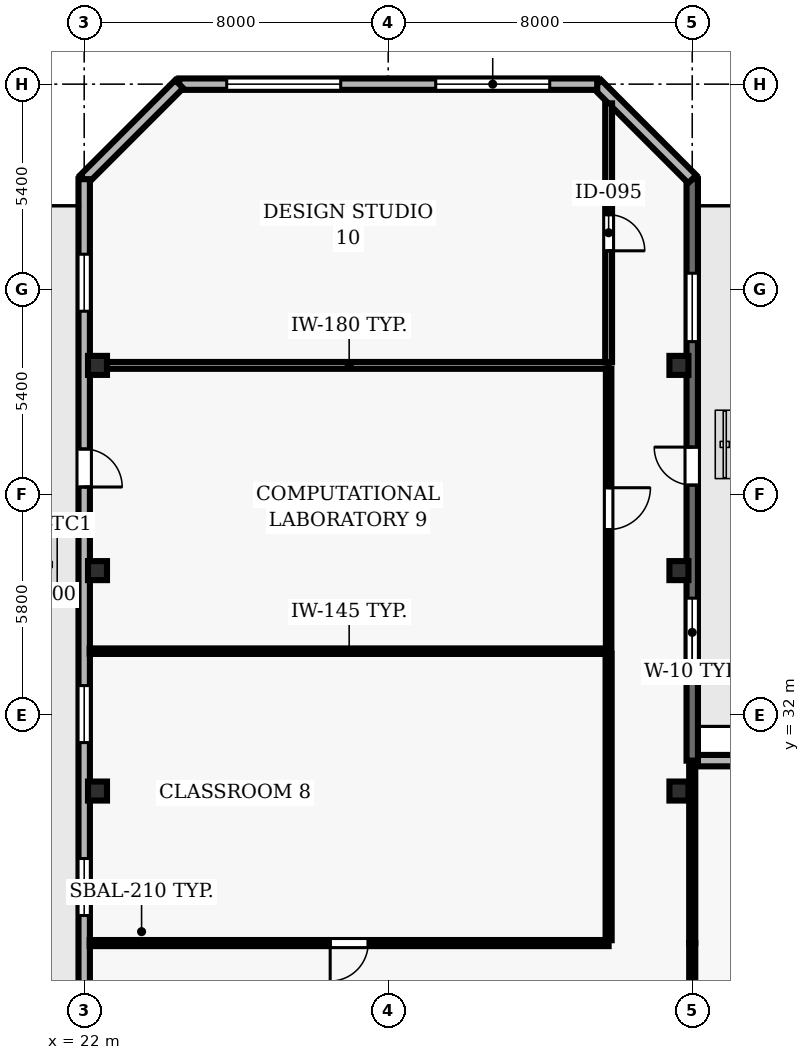
"""IFC4 building model, lengths in metres.
Left out: names, types, materials, properties, quantities, classifications, styles, units other than length and angle.
Written with IfcOpenShell. Run it as: python <this file> out.ifc"""

import sys

from ifc_helpers import new_model, si_unit, direction, frame, frame_2d, origin, origin_2d, place, context, subcontext, project, spatial, rectangle, hollow_rectangle, extrude, element, fill, save


model = new_model("IFC4")
c1 = context("Model", 3, precision=1e-05, world=origin(), true_north=direction((0.0, 1.0)))
c2 = subcontext(c1, "Body", "Model", "MODEL_VIEW")
j1 = project(units=[si_unit("LENGTHUNIT", "METRE"), si_unit("PLANEANGLEUNIT", "RADIAN")], contexts=[c1])
p1 = place(None, origin())
s1 = spatial("IfcSite", under=j1, at=p1, CompositionType="ELEMENT")
p2 = place(p1, origin())
s2 = spatial("IfcBuilding", under=s1, at=p2, CompositionType="ELEMENT")
p3 = place(p2, frame((0.0, 0.0, 107.3)))
s3 = spatial("IfcBuildingStorey", under=s2, at=p3, CompositionType="ELEMENT", Elevation=107.3)
for number, where, z_axis, x_axis in (
    (1, (22.35, 30.0, 0.0), (0.0, 0.0, 1.0), (1.0, 0.0, 0.0)),
    (2, (37.65, 30.0, 0.0), (0.0, 0.0, 1.0), (1.0, 0.0, 0.0)),
    (3, (22.35, 35.8, 0.0), (0.0, 0.0, 1.0), (1.0, 0.0, 0.0)),
    (4, (37.65, 35.8, 0.0), (0.0, 0.0, 1.0), (1.0, 0.0, 0.0)),
    (5, (22.35, 41.2, 0.0), (0.0, 0.0, 1.0), (1.0, 0.0, 0.0)),
    (6, (37.65, 41.2, 0.0), (0.0, 0.0, 1.0), (1.0, 0.0, 0.0)),
):
    element("IfcColumn", number, at=place(p3, frame(where, z_axis=z_axis, x_axis=x_axis)), inside=s3, PredefinedType="COLUMN", context=c2, shape_type="SweptSolid", body=[
        extrude(hollow_rectangle(XDim=0.5, YDim=0.5, WallThickness=0.025, at=origin_2d()), origin(), (0.0, 0.0, 1.0), 3.9),
    ])
p4 = place(p3, frame((47.456, 30.8, 0.0), z_axis=(0.0, 0.0, 1.0), x_axis=(-1.0, 0.0, 0.0)))
e7 = element("IfcWall", 7, at=p4, inside=s3, PredefinedType="SOLIDWALL", context=c2, shape_type="SweptSolid", body=[
    extrude(rectangle(XDim=9.456, YDim=0.3, at=frame_2d((4.728, 0.0))), origin(), (0.0, 0.0, 1.0), 3.69),
])
p5 = place(p4, frame((3.328, 0.0, 0.9)))
e8 = element("IfcOpeningElement", 8, at=p5, cuts=e7, PredefinedType="OPENING", context=c2, shape_type="SweptSolid", body=[
    extrude(rectangle(XDim=2.8, YDim=1.8, at=frame_2d((1.4, 0.9))), frame((0.0, 0.16, 0.0), z_axis=(0.0, -1.0, 0.0), x_axis=(1.0, 0.0, 0.0)), (0.0, 0.0, 1.0), 0.32),
])
p6 = place(p3, frame((38.0, 30.8, 0.0), z_axis=(0.0, 0.0, 1.0), x_axis=(0.0, 1.0, 0.0)))
e9 = element("IfcWall", 9, at=p6, inside=s3, PredefinedType="SOLIDWALL", context=c2, shape_type="SweptSolid", body=[
    extrude(rectangle(XDim=15.3, YDim=0.3, at=frame_2d((7.65, 0.0))), origin(), (0.0, 0.0, 1.0), 3.69),
])
p7 = place(p6, frame((7.25, 0.0, 0.0)))
e10 = element("IfcOpeningElement", 10, at=p7, cuts=e9, PredefinedType="OPENING", context=c2, shape_type="SweptSolid", body=[
    extrude(rectangle(XDim=1.0, YDim=2.2, at=frame_2d((0.5, 1.1))), frame((0.0, 0.16, 0.0), z_axis=(0.0, -1.0, 0.0), x_axis=(1.0, 0.0, 0.0)), (0.0, 0.0, 1.0), 0.32),
])
p8 = place(p6, frame((2.475, 0.0, 0.9)))
e11 = element("IfcOpeningElement", 11, at=p8, cuts=e9, PredefinedType="OPENING", context=c2, shape_type="SweptSolid", body=[
    extrude(rectangle(XDim=1.8, YDim=2.2, at=frame_2d((0.9, 1.1))), frame((0.0, 0.16, 0.0), z_axis=(0.0, -1.0, 0.0), x_axis=(1.0, 0.0, 0.0)), (0.0, 0.0, 1.0), 0.32),
])
p9 = place(p6, frame((11.025, 0.0, 0.9)))
e12 = element("IfcOpeningElement", 12, at=p9, cuts=e9, PredefinedType="OPENING", context=c2, shape_type="SweptSolid", body=[
    extrude(rectangle(XDim=1.8, YDim=2.2, at=frame_2d((0.9, 1.1))), frame((0.0, 0.16, 0.0), z_axis=(0.0, -1.0, 0.0), x_axis=(1.0, 0.0, 0.0)), (0.0, 0.0, 1.0), 0.32),
])
p10 = place(p3, frame((38.0, 46.1, 0.0), z_axis=(0.0, 0.0, 1.0), x_axis=(-0.707106781187, 0.707106781187, 0.0)))
e13 = element("IfcWall", 13, at=p10, inside=s3, PredefinedType="SOLIDWALL", context=c2, shape_type="SweptSolid", body=[
    extrude(rectangle(XDim=3.536, YDim=0.3, at=frame_2d((1.768, 0.0))), origin(), (0.0, 0.0, 1.0), 3.69),
])
p11 = place(p3, frame((35.5, 48.6, 0.0), z_axis=(0.0, 0.0, 1.0), x_axis=(-1.0, 0.0, 0.0)))
e14 = element("IfcWall", 14, at=p11, inside=s3, PredefinedType="SOLIDWALL", context=c2, shape_type="SweptSolid", body=[
    extrude(rectangle(XDim=11.0, YDim=0.3, at=frame_2d((5.5, 0.0))), origin(), (0.0, 0.0, 1.0), 3.69),
])
p12 = place(p11, frame((1.25, 0.0, 0.9)))
e15 = element("IfcOpeningElement", 15, at=p12, cuts=e14, PredefinedType="OPENING", context=c2, shape_type="SweptSolid", body=[
    extrude(rectangle(XDim=3.0, YDim=2.2, at=frame_2d((1.5, 1.1))), frame((0.0, 0.16, 0.0), z_axis=(0.0, -1.0, 0.0), x_axis=(1.0, 0.0, 0.0)), (0.0, 0.0, 1.0), 0.32),
])
p13 = place(p11, frame((6.75, 0.0, 0.9)))
e16 = element("IfcOpeningElement", 16, at=p13, cuts=e14, PredefinedType="OPENING", context=c2, shape_type="SweptSolid", body=[
    extrude(rectangle(XDim=3.0, YDim=2.2, at=frame_2d((1.5, 1.1))), frame((0.0, 0.16, 0.0), z_axis=(0.0, -1.0, 0.0), x_axis=(1.0, 0.0, 0.0)), (0.0, 0.0, 1.0), 0.32),
])
p14 = place(p3, frame((24.5, 48.6, 0.0), z_axis=(0.0, 0.0, 1.0), x_axis=(-0.707106781187, -0.707106781187, 0.0)))
e17 = element("IfcWall", 17, at=p14, inside=s3, PredefinedType="SOLIDWALL", context=c2, shape_type="SweptSolid", body=[
    extrude(rectangle(XDim=3.536, YDim=0.3, at=frame_2d((1.768, 0.0))), origin(), (0.0, 0.0, 1.0), 3.69),
])
p15 = place(p3, frame((22.0, 46.1, 0.0), z_axis=(0.0, 0.0, 1.0), x_axis=(0.0, -1.0, 0.0)))
e18 = element("IfcWall", 18, at=p15, inside=s3, PredefinedType="SOLIDWALL", context=c2, shape_type="SweptSolid", body=[
    extrude(rectangle(XDim=43.6, YDim=0.3, at=frame_2d((21.8, 0.0))), origin(), (0.0, 0.0, 1.0), 3.69),
])
p16 = place(p15, frame((7.1, 0.0, 0.0)))
e19 = element("IfcOpeningElement", 19, at=p16, cuts=e18, PredefinedType="OPENING", context=c2, shape_type="SweptSolid", body=[
    extrude(rectangle(XDim=1.0, YDim=2.2, at=frame_2d((0.5, 1.1))), frame((0.0, 0.16, 0.0), z_axis=(0.0, -1.0, 0.0), x_axis=(1.0, 0.0, 0.0)), (0.0, 0.0, 1.0), 0.32),
])
p17 = place(p15, frame((1.975, 0.0, 0.9)))
e20 = element("IfcOpeningElement", 20, at=p17, cuts=e18, PredefinedType="OPENING", context=c2, shape_type="SweptSolid", body=[
    extrude(rectangle(XDim=1.5, YDim=1.6, at=frame_2d((0.75, 0.8))), frame((0.0, 0.16, 0.0), z_axis=(0.0, -1.0, 0.0), x_axis=(1.0, 0.0, 0.0)), (0.0, 0.0, 1.0), 0.32),
])
p18 = place(p15, frame((13.325, 0.0, 0.9)))
e21 = element("IfcOpeningElement", 21, at=p18, cuts=e18, PredefinedType="OPENING", context=c2, shape_type="SweptSolid", body=[
    extrude(rectangle(XDim=1.5, YDim=1.6, at=frame_2d((0.75, 0.8))), frame((0.0, 0.16, 0.0), z_axis=(0.0, -1.0, 0.0), x_axis=(1.0, 0.0, 0.0)), (0.0, 0.0, 1.0), 0.32),
])
p19 = place(p15, frame((17.875, 0.0, 0.9)))
e22 = element("IfcOpeningElement", 22, at=p19, cuts=e18, PredefinedType="OPENING", context=c2, shape_type="SweptSolid", body=[
    extrude(rectangle(XDim=1.5, YDim=1.6, at=frame_2d((0.75, 0.8))), frame((0.0, 0.16, 0.0), z_axis=(0.0, -1.0, 0.0), x_axis=(1.0, 0.0, 0.0)), (0.0, 0.0, 1.0), 0.32),
])
p20 = place(p15, frame((23.775, 0.0, 0.9)))
e23 = element("IfcOpeningElement", 23, at=p20, cuts=e18, PredefinedType="OPENING", context=c2, shape_type="SweptSolid", body=[
    extrude(rectangle(XDim=1.5, YDim=1.6, at=frame_2d((0.75, 0.8))), frame((0.0, 0.16, 0.0), z_axis=(0.0, -1.0, 0.0), x_axis=(1.0, 0.0, 0.0)), (0.0, 0.0, 1.0), 0.32),
])
p21 = place(p15, frame((28.775, 0.0, 0.9)))
e24 = element("IfcOpeningElement", 24, at=p21, cuts=e18, PredefinedType="OPENING", context=c2, shape_type="SweptSolid", body=[
    extrude(rectangle(XDim=1.5, YDim=1.6, at=frame_2d((0.75, 0.8))), frame((0.0, 0.16, 0.0), z_axis=(0.0, -1.0, 0.0), x_axis=(1.0, 0.0, 0.0)), (0.0, 0.0, 1.0), 0.32),
])
p22 = place(p15, frame((34.675, 0.0, 0.9)))
e25 = element("IfcOpeningElement", 25, at=p22, cuts=e18, PredefinedType="OPENING", context=c2, shape_type="SweptSolid", body=[
    extrude(rectangle(XDim=1.5, YDim=1.6, at=frame_2d((0.75, 0.8))), frame((0.0, 0.16, 0.0), z_axis=(0.0, -1.0, 0.0), x_axis=(1.0, 0.0, 0.0)), (0.0, 0.0, 1.0), 0.32),
])
p23 = place(p3, frame((35.8, 26.0, 0.0), z_axis=(0.0, 0.0, 1.0), x_axis=(-1.0, 0.0, 0.0)))
e26 = element("IfcWall", 26, at=p23, inside=s3, PredefinedType="PARTITIONING", context=c2, shape_type="SweptSolid", body=[
    extrude(rectangle(XDim=13.655, YDim=0.16, at=frame_2d((6.828, 0.0))), origin(), (0.0, 0.0, 1.0), 3.69),
])
p24 = place(p23, frame((6.327, 0.0, 0.0)))
e27 = element("IfcOpeningElement", 27, at=p24, cuts=e26, PredefinedType="OPENING", context=c2, shape_type="SweptSolid", body=[
    extrude(rectangle(XDim=1.0, YDim=2.1, at=frame_2d((0.5, 1.05))), frame((0.0, 0.09, 0.0), z_axis=(0.0, -1.0, 0.0), x_axis=(1.0, 0.0, 0.0)), (0.0, 0.0, 1.0), 0.18),
])
p25 = place(p3, frame((35.8, 33.68, 0.0), z_axis=(0.0, 0.0, 1.0), x_axis=(-1.0, 0.0, 0.0)))
e28 = element("IfcWall", 28, at=p25, inside=s3, PredefinedType="PARTITIONING", context=c2, shape_type="SweptSolid", body=[
    extrude(rectangle(XDim=13.655, YDim=0.145, at=frame_2d((6.828, 0.0))), origin(), (0.0, 0.0, 1.0), 3.69),
])
p26 = place(p3, frame((35.8, 41.2, 0.0), z_axis=(0.0, 0.0, 1.0), x_axis=(-1.0, 0.0, 0.0)))
e29 = element("IfcWall", 29, at=p26, inside=s3, PredefinedType="PARTITIONING", context=c2, shape_type="SweptSolid", body=[
    extrude(rectangle(XDim=13.655, YDim=0.18, at=frame_2d((6.828, 0.0))), origin(), (0.0, 0.0, 1.0), 3.073),
])
p27 = place(p3, frame((35.8, 33.612, 0.0), z_axis=(0.0, 0.0, 1.0), x_axis=(0.0, -1.0, 0.0)))
e30 = element("IfcWall", 30, at=p27, inside=s3, PredefinedType="PARTITIONING", context=c2, shape_type="SweptSolid", body=[
    extrude(rectangle(XDim=7.537, YDim=0.16, at=frame_2d((3.769, 0.0))), origin(), (0.0, 0.0, 1.0), 3.69),
])
p28 = place(p3, frame((35.8, 41.115, 0.0), z_axis=(0.0, 0.0, 1.0), x_axis=(0.0, -1.0, 0.0)))
e31 = element("IfcWall", 31, at=p28, inside=s3, PredefinedType="PARTITIONING", context=c2, shape_type="SweptSolid", body=[
    extrude(rectangle(XDim=7.367, YDim=0.145, at=frame_2d((3.684, 0.0))), origin(), (0.0, 0.0, 1.0), 3.69),
])
p29 = place(p28, frame((3.134, 0.0, 0.0)))
e32 = element("IfcOpeningElement", 32, at=p29, cuts=e31, PredefinedType="OPENING", context=c2, shape_type="SweptSolid", body=[
    extrude(rectangle(XDim=1.1, YDim=2.15, at=frame_2d((0.55, 1.075))), frame((0.0, 0.083, 0.0), z_axis=(0.0, -1.0, 0.0), x_axis=(1.0, 0.0, 0.0)), (0.0, 0.0, 1.0), 0.165),
])
p30 = place(p3, frame((35.8, 48.095, 0.0), z_axis=(0.0, 0.0, 1.0), x_axis=(0.0, -1.0, 0.0)))
e33 = element("IfcWall", 33, at=p30, inside=s3, PredefinedType="PARTITIONING", context=c2, shape_type="SweptSolid", body=[
    extrude(rectangle(XDim=6.81, YDim=0.18, at=frame_2d((3.405, 0.0))), origin(), (0.0, 0.0, 1.0), 3.69),
])
p31 = place(p30, frame((2.93, 0.0, 0.0)))
e34 = element("IfcOpeningElement", 34, at=p31, cuts=e33, PredefinedType="OPENING", context=c2, shape_type="SweptSolid", body=[
    extrude(rectangle(XDim=0.95, YDim=2.1, at=frame_2d((0.475, 1.05))), frame((0.0, 0.1, 0.0), z_axis=(0.0, -1.0, 0.0), x_axis=(1.0, 0.0, 0.0)), (0.0, 0.0, 1.0), 0.2),
])
p32 = place(p3, frame((38.0, 23.85, 0.0), z_axis=(0.0, 0.0, 1.0), x_axis=(0.0, 1.0, 0.0)))
e35 = element("IfcWall", 35, at=p32, inside=s3, PredefinedType="PARTITIONING", context=c2, shape_type="SweptSolid", body=[
    extrude(rectangle(XDim=2.15, YDim=0.16, at=frame_2d((1.075, 0.0))), origin(), (0.0, 0.0, 1.0), 3.073),
])
p33 = place(p3, frame((38.0, 26.0, 0.0), z_axis=(0.0, 0.0, 1.0), x_axis=(0.0, 1.0, 0.0)))
e36 = element("IfcWall", 36, at=p33, inside=s3, PredefinedType="PARTITIONING", context=c2, shape_type="SweptSolid", body=[
    extrude(rectangle(XDim=4.655, YDim=0.16, at=frame_2d((2.328, 0.0))), origin(), (0.0, 0.0, 1.0), 3.073),
])
p34 = place(p7, origin())
e37 = element("IfcDoor", 37, at=p34, inside=s3, OperationType="SINGLE_SWING_RIGHT", PredefinedType="DOOR", context=c2, shape_type="SweptSolid", body=[
    extrude(rectangle(XDim=1.0, YDim=2.2, at=frame_2d((0.5, 1.1))), frame((0.0, 0.025, 0.0), z_axis=(0.0, -1.0, 0.0), x_axis=(1.0, 0.0, 0.0)), (0.0, 0.0, 1.0), 0.05),
])
fill(e10, e37)
p35 = place(p8, origin())
e38 = element("IfcWindow", 38, at=p35, inside=s3, PartitioningType="SINGLE_PANEL", PredefinedType="WINDOW", context=c2, shape_type="SweptSolid", body=[
    extrude(rectangle(XDim=1.8, YDim=2.2, at=frame_2d((0.9, 1.1))), frame((0.0, 0.03, 0.0), z_axis=(0.0, -1.0, 0.0), x_axis=(1.0, 0.0, 0.0)), (0.0, 0.0, 1.0), 0.06),
])
fill(e11, e38)
p36 = place(p9, origin())
e39 = element("IfcWindow", 39, at=p36, inside=s3, PartitioningType="SINGLE_PANEL", PredefinedType="WINDOW", context=c2, shape_type="SweptSolid", body=[
    extrude(rectangle(XDim=1.8, YDim=2.2, at=frame_2d((0.9, 1.1))), frame((0.0, 0.03, 0.0), z_axis=(0.0, -1.0, 0.0), x_axis=(1.0, 0.0, 0.0)), (0.0, 0.0, 1.0), 0.06),
])
fill(e12, e39)
p37 = place(p12, origin())
e40 = element("IfcWindow", 40, at=p37, inside=s3, PartitioningType="SINGLE_PANEL", PredefinedType="WINDOW", context=c2, shape_type="SweptSolid", body=[
    extrude(rectangle(XDim=3.0, YDim=2.2, at=frame_2d((1.5, 1.1))), frame((0.0, 0.03, 0.0), z_axis=(0.0, -1.0, 0.0), x_axis=(1.0, 0.0, 0.0)), (0.0, 0.0, 1.0), 0.06),
])
fill(e15, e40)
p38 = place(p13, origin())
e41 = element("IfcWindow", 41, at=p38, inside=s3, PartitioningType="SINGLE_PANEL", PredefinedType="WINDOW", context=c2, shape_type="SweptSolid", body=[
    extrude(rectangle(XDim=3.0, YDim=2.2, at=frame_2d((1.5, 1.1))), frame((0.0, 0.03, 0.0), z_axis=(0.0, -1.0, 0.0), x_axis=(1.0, 0.0, 0.0)), (0.0, 0.0, 1.0), 0.06),
])
fill(e16, e41)
p39 = place(p16, origin())
e42 = element("IfcDoor", 42, at=p39, inside=s3, OperationType="SINGLE_SWING_RIGHT", PredefinedType="DOOR", context=c2, shape_type="SweptSolid", body=[
    extrude(rectangle(XDim=1.0, YDim=2.2, at=frame_2d((0.5, 1.1))), frame((0.0, 0.025, 0.0), z_axis=(0.0, -1.0, 0.0), x_axis=(1.0, 0.0, 0.0)), (0.0, 0.0, 1.0), 0.05),
])
fill(e19, e42)
p40 = place(p17, origin())
e43 = element("IfcWindow", 43, at=p40, inside=s3, PartitioningType="SINGLE_PANEL", PredefinedType="WINDOW", context=c2, shape_type="SweptSolid", body=[
    extrude(rectangle(XDim=1.5, YDim=1.6, at=frame_2d((0.75, 0.8))), frame((0.0, 0.03, 0.0), z_axis=(0.0, -1.0, 0.0), x_axis=(1.0, 0.0, 0.0)), (0.0, 0.0, 1.0), 0.06),
])
fill(e20, e43)
p41 = place(p18, origin())
e44 = element("IfcWindow", 44, at=p41, inside=s3, PartitioningType="SINGLE_PANEL", PredefinedType="WINDOW", context=c2, shape_type="SweptSolid", body=[
    extrude(rectangle(XDim=1.5, YDim=1.6, at=frame_2d((0.75, 0.8))), frame((0.0, 0.03, 0.0), z_axis=(0.0, -1.0, 0.0), x_axis=(1.0, 0.0, 0.0)), (0.0, 0.0, 1.0), 0.06),
])
fill(e21, e44)
p42 = place(p19, origin())
e45 = element("IfcWindow", 45, at=p42, inside=s3, PartitioningType="SINGLE_PANEL", PredefinedType="WINDOW", context=c2, shape_type="SweptSolid", body=[
    extrude(rectangle(XDim=1.5, YDim=1.6, at=frame_2d((0.75, 0.8))), frame((0.0, 0.03, 0.0), z_axis=(0.0, -1.0, 0.0), x_axis=(1.0, 0.0, 0.0)), (0.0, 0.0, 1.0), 0.06),
])
fill(e22, e45)
p43 = place(p24, origin())
e46 = element("IfcDoor", 46, at=p43, inside=s3, OperationType="SINGLE_SWING_RIGHT", PredefinedType="DOOR", context=c2, shape_type="SweptSolid", body=[
    extrude(rectangle(XDim=1.0, YDim=2.1, at=frame_2d((0.5, 1.05))), frame((0.0, 0.025, 0.0), z_axis=(0.0, -1.0, 0.0), x_axis=(1.0, 0.0, 0.0)), (0.0, 0.0, 1.0), 0.05),
])
fill(e27, e46)
p44 = place(p29, origin())
e47 = element("IfcDoor", 47, at=p44, inside=s3, OperationType="SINGLE_SWING_LEFT", PredefinedType="DOOR", context=c2, shape_type="SweptSolid", body=[
    extrude(rectangle(XDim=1.1, YDim=2.15, at=frame_2d((0.55, 1.075))), frame((0.0, 0.025, 0.0), z_axis=(0.0, -1.0, 0.0), x_axis=(1.0, 0.0, 0.0)), (0.0, 0.0, 1.0), 0.05),
])
fill(e32, e47)
p45 = place(p31, origin())
e48 = element("IfcDoor", 48, at=p45, inside=s3, OperationType="SINGLE_SWING_RIGHT", PredefinedType="DOOR", context=c2, shape_type="SweptSolid", body=[
    extrude(rectangle(XDim=0.95, YDim=2.1, at=frame_2d((0.475, 1.05))), frame((0.0, 0.025, 0.0), z_axis=(0.0, -1.0, 0.0), x_axis=(1.0, 0.0, 0.0)), (0.0, 0.0, 1.0), 0.05),
])
fill(e34, e48)
save(model, sys.argv[1])
